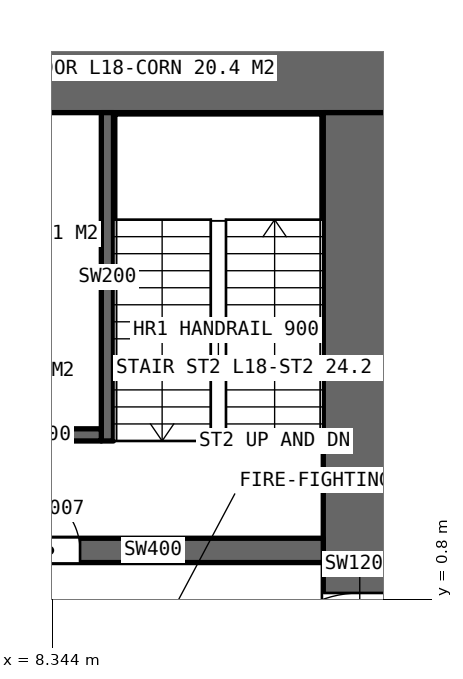
"""IFC4 building model, lengths in metres.
Left out: names, types, materials, properties, quantities, classifications, styles, units other than length and angle.
Written with IfcOpenShell. Run it as: python <this file> out.ifc"""

import sys

from ifc_helpers import new_model, si_unit, direction, frame, frame_2d, origin, place, context, subcontext, project, spatial, rectangle, extrude, element, fill, save


model = new_model("IFC4")
c1 = context("Model", 3, precision=1e-05, world=origin(), true_north=direction((0.0, 1.0)))
c2 = subcontext(c1, "Body", "Model", "MODEL_VIEW")
j1 = project(units=[si_unit("LENGTHUNIT", "METRE"), si_unit("PLANEANGLEUNIT", "RADIAN")], contexts=[c1])
p1 = place(None, origin())
s1 = spatial("IfcSite", under=j1, at=p1, CompositionType="ELEMENT")
p2 = place(p1, origin())
s2 = spatial("IfcBuilding", under=s1, at=p2, CompositionType="ELEMENT")
p3 = place(p2, frame((0.0, 0.0, 90.0)))
s3 = spatial("IfcBuildingStorey", under=s2, at=p3, CompositionType="ELEMENT", Elevation=90.0)
p4 = place(p3, frame((14.0, 9.4, 0.0), z_axis=(0.0, 0.0, 1.0), x_axis=(-1.0, 0.0, 0.0)))
e1 = element("IfcWall", 1, at=p4, inside=s3, PredefinedType="SHEAR", context=c2, shape_type="SweptSolid", body=[
    extrude(rectangle(XDim=28.0, YDim=1.2, at=frame_2d((14.0, 0.0))), origin(), (0.0, 0.0, 1.0), 5.0),
])
p5 = place(p4, frame((24.0, 0.0, 0.0)))
e2 = element("IfcOpeningElement", 2, at=p5, cuts=e1, PredefinedType="OPENING", context=c2, shape_type="SweptSolid", body=[
    extrude(rectangle(XDim=1.0, YDim=2.4, at=frame_2d((0.5, 1.2))), frame((0.0, 0.61, 0.0), z_axis=(0.0, -1.0, 0.0), x_axis=(1.0, 0.0, 0.0)), (0.0, 0.0, 1.0), 1.22),
])
p6 = place(p4, frame((13.1, 0.0, 0.0)))
e3 = element("IfcOpeningElement", 3, at=p6, cuts=e1, PredefinedType="OPENING", context=c2, shape_type="SweptSolid", body=[
    extrude(rectangle(XDim=1.8, YDim=2.4, at=frame_2d((0.9, 1.2))), frame((0.0, 0.61, 0.0), z_axis=(0.0, -1.0, 0.0), x_axis=(1.0, 0.0, 0.0)), (0.0, 0.0, 1.0), 1.22),
])
p7 = place(p3, frame((13.4, -8.8, 0.0), z_axis=(0.0, 0.0, 1.0), x_axis=(0.0, 1.0, 0.0)))
e4 = element("IfcWall", 4, at=p7, inside=s3, PredefinedType="SHEAR", context=c2, shape_type="SweptSolid", body=[
    extrude(rectangle(XDim=17.6, YDim=1.2, at=frame_2d((8.8, 0.0))), origin(), (0.0, 0.0, 1.0), 5.0),
])
p8 = place(p7, frame((7.9, 0.0, 0.0)))
e5 = element("IfcOpeningElement", 5, at=p8, cuts=e4, PredefinedType="OPENING", context=c2, shape_type="SweptSolid", body=[
    extrude(rectangle(XDim=1.8, YDim=2.4, at=frame_2d((0.9, 1.2))), frame((0.0, 0.61, 0.0), z_axis=(0.0, -1.0, 0.0), x_axis=(1.0, 0.0, 0.0)), (0.0, 0.0, 1.0), 1.22),
])
p9 = place(p3, frame((7.2, 1.6, 0.0), z_axis=(0.0, 0.0, 1.0), x_axis=(1.0, 0.0, 0.0)))
e6 = element("IfcWall", 6, at=p9, inside=s3, PredefinedType="SHEAR", context=c2, shape_type="SweptSolid", body=[
    extrude(rectangle(XDim=5.6, YDim=0.4, at=frame_2d((2.8, 0.0))), origin(), (0.0, 0.0, 1.0), 5.0),
])
p10 = place(p9, frame((0.6, 0.0, 0.0)))
e7 = element("IfcOpeningElement", 7, at=p10, cuts=e6, PredefinedType="OPENING", context=c2, shape_type="SweptSolid", body=[
    extrude(rectangle(XDim=1.0, YDim=2.4, at=frame_2d((0.5, 1.2))), frame((0.0, 0.21, 0.0), z_axis=(0.0, -1.0, 0.0), x_axis=(1.0, 0.0, 0.0)), (0.0, 0.0, 1.0), 0.42),
])
p11 = place(p3, frame((9.25, 3.4, 0.0), z_axis=(0.0, 0.0, 1.0), x_axis=(0.0, 1.0, 0.0)))
e8 = element("IfcWall", 8, at=p11, inside=s3, PredefinedType="SOLIDWALL", context=c2, shape_type="SweptSolid", body=[
    extrude(rectangle(XDim=5.4, YDim=0.2, at=frame_2d((2.7, 0.0))), origin(), (0.0, 0.0, 1.0), 5.0),
])
p12 = place(p3, frame((9.15, 3.5, 0.0), z_axis=(0.0, 0.0, 1.0), x_axis=(-1.0, 0.0, 0.0)))
e9 = element("IfcWall", 9, at=p12, inside=s3, PredefinedType="SOLIDWALL", context=c2, shape_type="SweptSolid", body=[
    extrude(rectangle(XDim=1.95, YDim=0.2, at=frame_2d((0.975, 0.0))), origin(), (0.0, 0.0, 1.0), 5.0),
])
p13 = place(p8, origin())
e10 = element("IfcDoor", 10, at=p13, inside=s3, OperationType="DOUBLE_DOOR_SINGLE_SWING", PredefinedType="DOOR", context=c2, shape_type="SweptSolid", body=[
    extrude(rectangle(XDim=1.8, YDim=2.4, at=frame_2d((0.9, 1.2))), frame((0.0, 0.025, 0.0), z_axis=(0.0, -1.0, 0.0), x_axis=(1.0, 0.0, 0.0)), (0.0, 0.0, 1.0), 0.05),
])
fill(e5, e10)
p14 = place(p10, origin())
e11 = element("IfcDoor", 11, at=p14, inside=s3, OperationType="SINGLE_SWING_LEFT", PredefinedType="DOOR", context=c2, shape_type="SweptSolid", body=[
    extrude(rectangle(XDim=1.0, YDim=2.4, at=frame_2d((0.5, 1.2))), frame((0.0, 0.025, 0.0), z_axis=(0.0, -1.0, 0.0), x_axis=(1.0, 0.0, 0.0)), (0.0, 0.0, 1.0), 0.05),
])
fill(e7, e11)
save(model, sys.argv[1])
